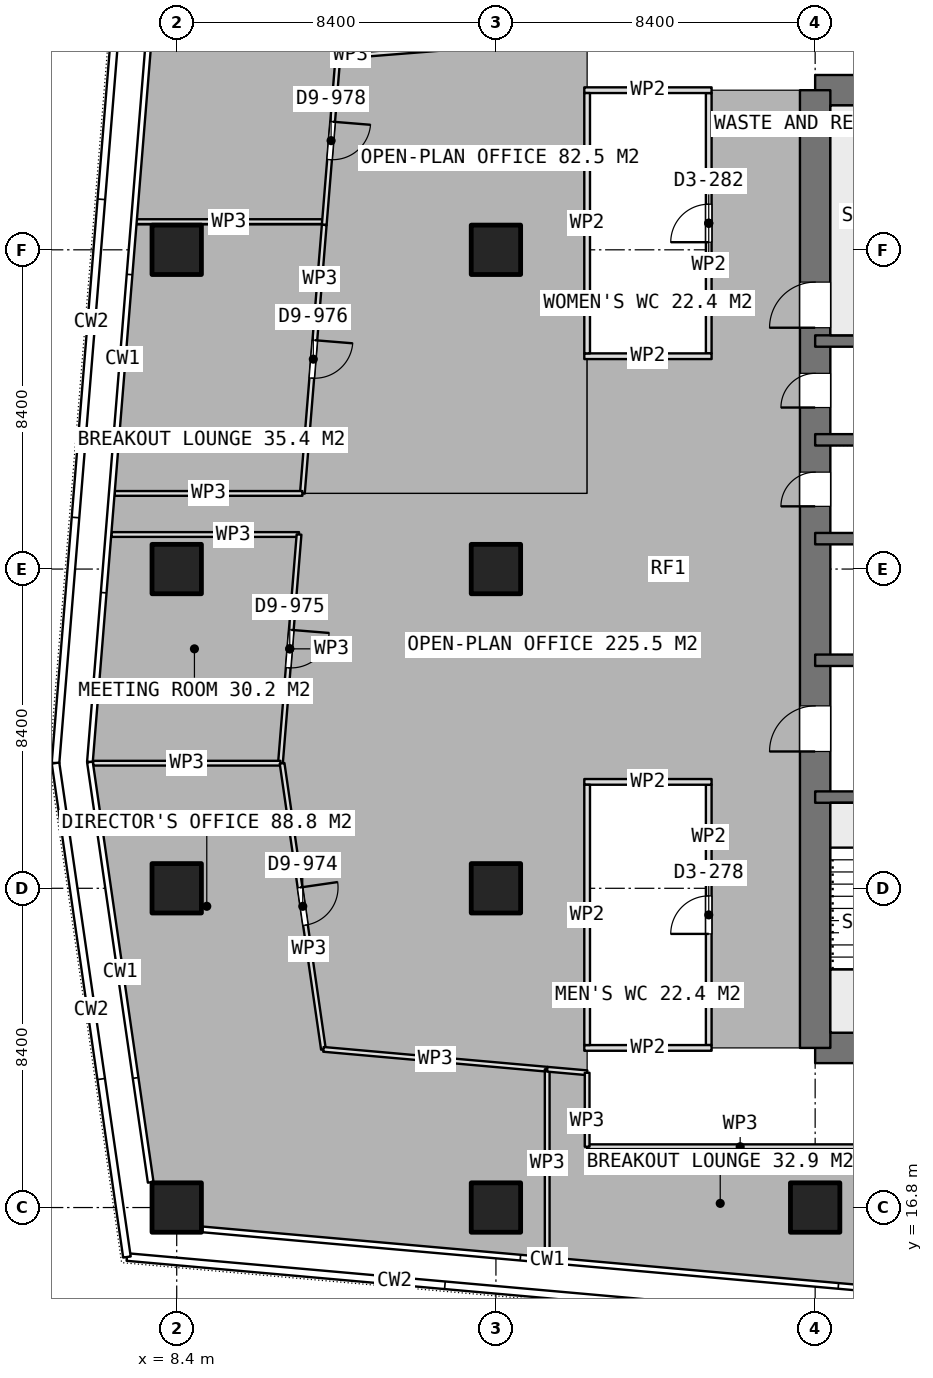
"""IFC4 building model, lengths in metres.
Left out: names, types, materials, properties, quantities, classifications, styles, units other than length and angle.
Written with IfcOpenShell. Run it as: python <this file> out.ifc"""

import sys

from ifc_helpers import new_model, si_unit, direction, frame, frame_2d, origin, origin_2d, place, context, subcontext, project, spatial, rectangle, extrude, element, fill, save


model = new_model("IFC4")
c1 = context("Model", 3, precision=1e-05, world=origin(), true_north=direction((0.0, 1.0)))
c2 = subcontext(c1, "Body", "Model", "MODEL_VIEW")
j1 = project(units=[si_unit("LENGTHUNIT", "METRE"), si_unit("PLANEANGLEUNIT", "RADIAN")], contexts=[c1])
p1 = place(None, origin())
s1 = spatial("IfcSite", under=j1, at=p1, CompositionType="ELEMENT")
p2 = place(p1, origin())
s2 = spatial("IfcBuilding", under=s1, at=p2, CompositionType="ELEMENT")
p3 = place(p2, frame((0.0, 0.0, 261.35)))
s3 = spatial("IfcBuildingStorey", under=s2, at=p3, CompositionType="ELEMENT", Elevation=261.35)
for number, where, z_axis, x_axis in (
    (1, (25.2, 21.0, 0.0), (0.0, 0.0, 1.0), (1.0, 0.0, 0.0)),
    (2, (25.2, 46.2, 0.0), (0.0, 0.0, 1.0), (1.0, 0.0, 0.0)),
):
    element("IfcWall", number, at=place(p3, frame(where, z_axis=z_axis, x_axis=x_axis)), inside=s3, PredefinedType="SHEAR", context=c2, shape_type="SweptSolid", body=[
        extrude(rectangle(XDim=10.4, YDim=0.8, at=frame_2d((5.2, 0.0))), origin(), (0.0, 0.0, 1.0), 3.75),
    ])
p4 = place(p3, frame((25.2, 21.0, 0.0), z_axis=(0.0, 0.0, 1.0), x_axis=(0.0, 1.0, 0.0)))
e3 = element("IfcWall", 3, at=p4, inside=s3, PredefinedType="SHEAR", context=c2, shape_type="SweptSolid", body=[
    extrude(rectangle(XDim=25.2, YDim=0.8, at=frame_2d((12.6, 0.0))), origin(), (0.0, 0.0, 1.0), 3.75),
])
p5 = place(p4, frame((7.8, 0.0, 0.0)))
e4 = element("IfcOpeningElement", 4, at=p5, cuts=e3, PredefinedType="OPENING", context=c2, shape_type="SweptSolid", body=[
    extrude(rectangle(XDim=1.2, YDim=2.1, at=frame_2d((0.6, 1.05))), frame((0.0, 0.41, 0.0), z_axis=(0.0, -1.0, 0.0), x_axis=(1.0, 0.0, 0.0)), (0.0, 0.0, 1.0), 0.82),
])
p6 = place(p4, frame((14.25, 0.0, 0.0)))
e5 = element("IfcOpeningElement", 5, at=p6, cuts=e3, PredefinedType="OPENING", context=c2, shape_type="SweptSolid", body=[
    extrude(rectangle(XDim=0.9, YDim=2.1, at=frame_2d((0.45, 1.05))), frame((0.0, 0.41, 0.0), z_axis=(0.0, -1.0, 0.0), x_axis=(1.0, 0.0, 0.0)), (0.0, 0.0, 1.0), 0.82),
])
p7 = place(p4, frame((16.85, 0.0, 0.0)))
e6 = element("IfcOpeningElement", 6, at=p7, cuts=e3, PredefinedType="OPENING", context=c2, shape_type="SweptSolid", body=[
    extrude(rectangle(XDim=0.9, YDim=2.1, at=frame_2d((0.45, 1.05))), frame((0.0, 0.41, 0.0), z_axis=(0.0, -1.0, 0.0), x_axis=(1.0, 0.0, 0.0)), (0.0, 0.0, 1.0), 0.82),
])
p8 = place(p4, frame((18.95, 0.0, 0.0)))
e7 = element("IfcOpeningElement", 7, at=p8, cuts=e3, PredefinedType="OPENING", context=c2, shape_type="SweptSolid", body=[
    extrude(rectangle(XDim=1.2, YDim=2.1, at=frame_2d((0.6, 1.05))), frame((0.0, 0.41, 0.0), z_axis=(0.0, -1.0, 0.0), x_axis=(1.0, 0.0, 0.0)), (0.0, 0.0, 1.0), 0.82),
])
p9 = place(p3, frame((25.2, 27.6, 0.0), z_axis=(0.0, 0.0, 1.0), x_axis=(1.0, 0.0, 0.0)))
e8 = element("IfcWall", 8, at=p9, inside=s3, PredefinedType="SHEAR", context=c2, shape_type="SweptSolid", body=[
    extrude(rectangle(XDim=6.6, YDim=0.3, at=frame_2d((3.3, 0.0))), origin(), (0.0, 0.0, 1.0), 3.75),
])
p10 = place(p9, frame((5.05, 0.0, 0.0)))
e9 = element("IfcOpeningElement", 9, at=p10, cuts=e8, PredefinedType="OPENING", context=c2, shape_type="SweptSolid", body=[
    extrude(rectangle(XDim=1.2, YDim=2.1, at=frame_2d((0.6, 1.05))), frame((0.0, 0.16, 0.0), z_axis=(0.0, -1.0, 0.0), x_axis=(1.0, 0.0, 0.0)), (0.0, 0.0, 1.0), 0.32),
])
p11 = place(p3, frame((25.2, 31.2, 0.0), z_axis=(0.0, 0.0, 1.0), x_axis=(1.0, 0.0, 0.0)))
e10 = element("IfcWall", 10, at=p11, inside=s3, PredefinedType="SHEAR", context=c2, shape_type="SweptSolid", body=[
    extrude(rectangle(XDim=6.6, YDim=0.3, at=frame_2d((3.3, 0.0))), origin(), (0.0, 0.0, 1.0), 3.75),
])
p12 = place(p11, frame((2.65, 0.0, 0.0)))
e11 = element("IfcOpeningElement", 11, at=p12, cuts=e10, PredefinedType="OPENING", context=c2, shape_type="SweptSolid", body=[
    extrude(rectangle(XDim=1.3, YDim=2.1, at=frame_2d((0.65, 1.05))), frame((0.0, 0.16, 0.0), z_axis=(0.0, -1.0, 0.0), x_axis=(1.0, 0.0, 0.0)), (0.0, 0.0, 1.0), 0.32),
])
for number, where, z_axis, x_axis in (
    (12, (25.2, 34.4, 0.0), (0.0, 0.0, 1.0), (1.0, 0.0, 0.0)),
    (13, (25.2, 37.0, 0.0), (0.0, 0.0, 1.0), (1.0, 0.0, 0.0)),
    (14, (25.2, 39.6, 0.0), (0.0, 0.0, 1.0), (1.0, 0.0, 0.0)),
):
    element("IfcWall", number, at=place(p3, frame(where, z_axis=z_axis, x_axis=x_axis)), inside=s3, PredefinedType="SHEAR", context=c2, shape_type="SweptSolid", body=[
        extrude(rectangle(XDim=6.6, YDim=0.3, at=frame_2d((3.3, 0.0))), origin(), (0.0, 0.0, 1.0), 3.75),
    ])
for number, where, z_axis, x_axis in (
    (15, (8.4, 16.8, 0.0), (0.0, 0.0, 1.0), (1.0, 0.0, 0.0)),
    (16, (8.4, 25.2, 0.0), (0.0, 0.0, 1.0), (1.0, 0.0, 0.0)),
    (17, (8.4, 33.6, 0.0), (0.0, 0.0, 1.0), (1.0, 0.0, 0.0)),
    (18, (8.4, 42.0, 0.0), (0.0, 0.0, 1.0), (1.0, 0.0, 0.0)),
    (19, (16.8, 16.8, 0.0), (0.0, 0.0, 1.0), (1.0, 0.0, 0.0)),
    (20, (16.8, 25.2, 0.0), (0.0, 0.0, 1.0), (1.0, 0.0, 0.0)),
    (21, (16.8, 33.6, 0.0), (0.0, 0.0, 1.0), (1.0, 0.0, 0.0)),
    (22, (16.8, 42.0, 0.0), (0.0, 0.0, 1.0), (1.0, 0.0, 0.0)),
    (23, (25.2, 16.8, 0.0), (0.0, 0.0, 1.0), (1.0, 0.0, 0.0)),
):
    element("IfcColumn", number, at=place(p3, frame(where, z_axis=z_axis, x_axis=x_axis)), inside=s3, PredefinedType="COLUMN", context=c2, shape_type="SweptSolid", body=[
        extrude(rectangle(XDim=1.3, YDim=1.3, at=origin_2d()), origin(), (0.0, 0.0, 1.0), 3.75),
    ])
for number, where, z_axis, x_axis in (
    (24, (19.125, 39.2, 0.0), (0.0, 0.0, 1.0), (1.0, 0.0, 0.0)),
    (25, (19.125, 46.2, 0.0), (0.0, 0.0, 1.0), (1.0, 0.0, 0.0)),
):
    element("IfcWall", number, at=place(p3, frame(where, z_axis=z_axis, x_axis=x_axis)), inside=s3, PredefinedType="PARTITIONING", context=c2, shape_type="SweptSolid", body=[
        extrude(rectangle(XDim=3.35, YDim=0.15, at=frame_2d((1.675, 0.0))), origin(), (0.0, 0.0, 1.0), 3.5),
    ])
p13 = place(p3, frame((19.2, 39.275, 0.0), z_axis=(0.0, 0.0, 1.0), x_axis=(0.0, 1.0, 0.0)))
e26 = element("IfcWall", 26, at=p13, inside=s3, PredefinedType="PARTITIONING", context=c2, shape_type="SweptSolid", body=[
    extrude(rectangle(XDim=6.85, YDim=0.15, at=frame_2d((3.425, 0.0))), origin(), (0.0, 0.0, 1.0), 3.5),
])
p14 = place(p3, frame((22.4, 39.275, 0.0), z_axis=(0.0, 0.0, 1.0), x_axis=(0.0, 1.0, 0.0)))
e27 = element("IfcWall", 27, at=p14, inside=s3, PredefinedType="PARTITIONING", context=c2, shape_type="SweptSolid", body=[
    extrude(rectangle(XDim=6.85, YDim=0.15, at=frame_2d((3.425, 0.0))), origin(), (0.0, 0.0, 1.0), 3.5),
])
p15 = place(p14, frame((2.925, 0.0, 0.0)))
e28 = element("IfcOpeningElement", 28, at=p15, cuts=e27, PredefinedType="OPENING", context=c2, shape_type="SweptSolid", body=[
    extrude(rectangle(XDim=1.0, YDim=2.1, at=frame_2d((0.5, 1.05))), frame((0.0, 0.085, 0.0), z_axis=(0.0, -1.0, 0.0), x_axis=(1.0, 0.0, 0.0)), (0.0, 0.0, 1.0), 0.17),
])
for number, where, z_axis, x_axis in (
    (29, (19.125, 21.0, 0.0), (0.0, 0.0, 1.0), (1.0, 0.0, 0.0)),
    (30, (19.125, 28.0, 0.0), (0.0, 0.0, 1.0), (1.0, 0.0, 0.0)),
):
    element("IfcWall", number, at=place(p3, frame(where, z_axis=z_axis, x_axis=x_axis)), inside=s3, PredefinedType="PARTITIONING", context=c2, shape_type="SweptSolid", body=[
        extrude(rectangle(XDim=3.35, YDim=0.15, at=frame_2d((1.675, 0.0))), origin(), (0.0, 0.0, 1.0), 3.5),
    ])
p16 = place(p3, frame((19.2, 21.075, 0.0), z_axis=(0.0, 0.0, 1.0), x_axis=(0.0, 1.0, 0.0)))
e31 = element("IfcWall", 31, at=p16, inside=s3, PredefinedType="PARTITIONING", context=c2, shape_type="SweptSolid", body=[
    extrude(rectangle(XDim=6.85, YDim=0.15, at=frame_2d((3.425, 0.0))), origin(), (0.0, 0.0, 1.0), 3.5),
])
p17 = place(p3, frame((22.4, 21.075, 0.0), z_axis=(0.0, 0.0, 1.0), x_axis=(0.0, 1.0, 0.0)))
e32 = element("IfcWall", 32, at=p17, inside=s3, PredefinedType="PARTITIONING", context=c2, shape_type="SweptSolid", body=[
    extrude(rectangle(XDim=6.85, YDim=0.15, at=frame_2d((3.425, 0.0))), origin(), (0.0, 0.0, 1.0), 3.5),
])
p18 = place(p17, frame((2.925, 0.0, 0.0)))
e33 = element("IfcOpeningElement", 33, at=p18, cuts=e32, PredefinedType="OPENING", context=c2, shape_type="SweptSolid", body=[
    extrude(rectangle(XDim=1.0, YDim=2.1, at=frame_2d((0.5, 1.05))), frame((0.0, 0.085, 0.0), z_axis=(0.0, -1.0, 0.0), x_axis=(1.0, 0.0, 0.0)), (0.0, 0.0, 1.0), 0.17),
])
p19 = place(p3, frame((12.226, 42.742, 0.0), z_axis=(0.0, 0.0, 1.0), x_axis=(-1.0, 0.0, 0.0)))
e34 = element("IfcWall", 34, at=p19, inside=s3, PredefinedType="PARTITIONING", context=c2, shape_type="SweptSolid", body=[
    extrude(rectangle(XDim=4.903, YDim=0.125, at=frame_2d((2.452, 0.0))), origin(), (0.0, 0.0, 1.0), 3.5),
])
p20 = place(p3, frame((15.95, 47.351, 0.0), z_axis=(0.0, 0.0, 1.0), x_axis=(-0.99682463174, -0.07962822086, 0.0)))
e35 = element("IfcWall", 35, at=p20, inside=s3, PredefinedType="PARTITIONING", context=c2, shape_type="SweptSolid", body=[
    extrude(rectangle(XDim=3.317, YDim=0.125, at=frame_2d((1.659, 0.0))), origin(), (0.0, 0.0, 1.0), 3.5),
])
p21 = place(p3, frame((12.643, 47.087, 0.0), z_axis=(0.0, 0.0, 1.0), x_axis=(-0.081240627764, -0.996694517092, 0.0)))
e36 = element("IfcWall", 36, at=p21, inside=s3, PredefinedType="PARTITIONING", context=c2, shape_type="SweptSolid", body=[
    extrude(rectangle(XDim=4.445, YDim=0.125, at=frame_2d((2.222, 0.0))), origin(), (0.0, 0.0, 1.0), 3.5),
])
p22 = place(p21, frame((1.722, 0.0, 0.0)))
e37 = element("IfcOpeningElement", 37, at=p22, cuts=e36, PredefinedType="OPENING", context=c2, shape_type="SweptSolid", body=[
    extrude(rectangle(XDim=1.0, YDim=2.1, at=frame_2d((0.5, 1.05))), frame((0.0, 0.073, 0.0), z_axis=(0.0, -1.0, 0.0), x_axis=(1.0, 0.0, 0.0)), (0.0, 0.0, 1.0), 0.145),
])
p23 = place(p3, frame((12.282, 42.656, 0.0), z_axis=(0.0, 0.0, 1.0), x_axis=(-0.08110159124, -0.996705840205, 0.0)))
e38 = element("IfcWall", 38, at=p23, inside=s3, PredefinedType="PARTITIONING", context=c2, shape_type="SweptSolid", body=[
    extrude(rectangle(XDim=7.089, YDim=0.125, at=frame_2d((3.545, 0.0))), origin(), (0.0, 0.0, 1.0), 3.5),
])
p24 = place(p23, frame((3.045, 0.0, 0.0)))
e39 = element("IfcOpeningElement", 39, at=p24, cuts=e38, PredefinedType="OPENING", context=c2, shape_type="SweptSolid", body=[
    extrude(rectangle(XDim=1.0, YDim=2.1, at=frame_2d((0.5, 1.05))), frame((0.0, 0.073, 0.0), z_axis=(0.0, -1.0, 0.0), x_axis=(1.0, 0.0, 0.0)), (0.0, 0.0, 1.0), 0.145),
])
p25 = place(p3, frame((11.707, 35.59, 0.0), z_axis=(0.0, 0.0, 1.0), x_axis=(-1.0, 0.0, 0.0)))
e40 = element("IfcWall", 40, at=p25, inside=s3, PredefinedType="PARTITIONING", context=c2, shape_type="SweptSolid", body=[
    extrude(rectangle(XDim=4.936, YDim=0.125, at=frame_2d((2.468, 0.0))), origin(), (0.0, 0.0, 1.0), 3.5),
])
p26 = place(p3, frame((6.683, 34.509, 0.0), z_axis=(0.0, 0.0, 1.0), x_axis=(1.0, 0.0, 0.0)))
e41 = element("IfcWall", 41, at=p26, inside=s3, PredefinedType="PARTITIONING", context=c2, shape_type="SweptSolid", body=[
    extrude(rectangle(XDim=4.936, YDim=0.125, at=frame_2d((2.468, 0.0))), origin(), (0.0, 0.0, 1.0), 3.5),
])
p27 = place(p3, frame((11.619, 34.509, 0.0), z_axis=(0.0, 0.0, 1.0), x_axis=(-0.081003722278, -0.99671379893, 0.0)))
e42 = element("IfcWall", 42, at=p27, inside=s3, PredefinedType="PARTITIONING", context=c2, shape_type="SweptSolid", body=[
    extrude(rectangle(XDim=6.037, YDim=0.125, at=frame_2d((3.019, 0.0))), origin(), (0.0, 0.0, 1.0), 3.5),
])
p28 = place(p27, frame((2.518, 0.0, 0.0)))
e43 = element("IfcOpeningElement", 43, at=p28, cuts=e42, PredefinedType="OPENING", context=c2, shape_type="SweptSolid", body=[
    extrude(rectangle(XDim=1.0, YDim=2.1, at=frame_2d((0.5, 1.05))), frame((0.0, 0.073, 0.0), z_axis=(0.0, -1.0, 0.0), x_axis=(1.0, 0.0, 0.0)), (0.0, 0.0, 1.0), 0.145),
])
p29 = place(p3, frame((11.13, 28.492, 0.0), z_axis=(0.0, 0.0, 1.0), x_axis=(-1.0, 0.0, 0.0)))
e44 = element("IfcWall", 44, at=p29, inside=s3, PredefinedType="PARTITIONING", context=c2, shape_type="SweptSolid", body=[
    extrude(rectangle(XDim=4.929, YDim=0.125, at=frame_2d((2.464, 0.0))), origin(), (0.0, 0.0, 1.0), 3.5),
])
p30 = place(p3, frame((11.173, 28.488, 0.0), z_axis=(0.0, 0.0, 1.0), x_axis=(0.143061748966, -0.989713764673, 0.0)))
e45 = element("IfcWall", 45, at=p30, inside=s3, PredefinedType="PARTITIONING", context=c2, shape_type="SweptSolid", body=[
    extrude(rectangle(XDim=7.604, YDim=0.125, at=frame_2d((3.802, 0.0))), origin(), (0.0, 0.0, 1.0), 3.5),
])
p31 = place(p30, frame((3.301, 0.0, 0.0)))
e46 = element("IfcOpeningElement", 46, at=p31, cuts=e45, PredefinedType="OPENING", context=c2, shape_type="SweptSolid", body=[
    extrude(rectangle(XDim=1.0, YDim=2.1, at=frame_2d((0.5, 1.05))), frame((0.0, 0.073, 0.0), z_axis=(0.0, -1.0, 0.0), x_axis=(1.0, 0.0, 0.0)), (0.0, 0.0, 1.0), 0.145),
])
p32 = place(p3, frame((12.261, 20.962, 0.0), z_axis=(0.0, 0.0, 1.0), x_axis=(0.996078951833, -0.08846876124, 0.0)))
e47 = element("IfcWall", 47, at=p32, inside=s3, PredefinedType="PARTITIONING", context=c2, shape_type="SweptSolid", body=[
    extrude(rectangle(XDim=5.911, YDim=0.125, at=frame_2d((2.956, 0.0))), origin(), (0.0, 0.0, 1.0), 3.5),
])
p33 = place(p3, frame((18.149, 20.439, 0.0), z_axis=(0.0, 0.0, 1.0), x_axis=(0.0, -1.0, 0.0)))
e48 = element("IfcWall", 48, at=p33, inside=s3, PredefinedType="PARTITIONING", context=c2, shape_type="SweptSolid", body=[
    extrude(rectangle(XDim=4.939, YDim=0.125, at=frame_2d((2.469, 0.0))), origin(), (0.0, 0.0, 1.0), 3.5),
])
p34 = place(p3, frame((19.2, 18.4, 0.0), z_axis=(0.0, 0.0, 1.0), x_axis=(1.0, 0.0, 0.0)))
e49 = element("IfcWall", 49, at=p34, inside=s3, PredefinedType="PARTITIONING", context=c2, shape_type="SweptSolid", body=[
    extrude(rectangle(XDim=8.054, YDim=0.125, at=frame_2d((4.027, 0.0))), origin(), (0.0, 0.0, 1.0), 3.5),
])
p35 = place(p3, frame((18.15, 20.439, 0.0), z_axis=(0.0, 0.0, 1.0), x_axis=(0.996099374617, -0.088238517026, 0.0)))
e50 = element("IfcWall", 50, at=p35, inside=s3, PredefinedType="PARTITIONING", context=c2, shape_type="SweptSolid", body=[
    extrude(rectangle(XDim=1.054, YDim=0.125, at=frame_2d((0.527, 0.0))), origin(), (0.0, 0.0, 1.0), 3.5),
])
p36 = place(p3, frame((19.2, 20.346, 0.0), z_axis=(0.0, 0.0, 1.0), x_axis=(0.0, -1.0, 0.0)))
e51 = element("IfcWall", 51, at=p36, inside=s3, PredefinedType="PARTITIONING", context=c2, shape_type="SweptSolid", body=[
    extrude(rectangle(XDim=1.946, YDim=0.125, at=frame_2d((0.973, 0.0))), origin(), (0.0, 0.0, 1.0), 3.5),
])
p37 = place(p5, origin())
e52 = element("IfcDoor", 52, at=p37, inside=s3, OperationType="SINGLE_SWING_LEFT", PredefinedType="DOOR", context=c2, shape_type="SweptSolid", body=[
    extrude(rectangle(XDim=1.2, YDim=2.1, at=frame_2d((0.6, 1.05))), frame((0.0, 0.025, 0.0), z_axis=(0.0, -1.0, 0.0), x_axis=(1.0, 0.0, 0.0)), (0.0, 0.0, 1.0), 0.05),
])
fill(e4, e52)
p38 = place(p6, origin())
e53 = element("IfcDoor", 53, at=p38, inside=s3, OperationType="SINGLE_SWING_LEFT", PredefinedType="DOOR", context=c2, shape_type="SweptSolid", body=[
    extrude(rectangle(XDim=0.9, YDim=2.1, at=frame_2d((0.45, 1.05))), frame((0.0, 0.025, 0.0), z_axis=(0.0, -1.0, 0.0), x_axis=(1.0, 0.0, 0.0)), (0.0, 0.0, 1.0), 0.05),
])
fill(e5, e53)
p39 = place(p7, origin())
e54 = element("IfcDoor", 54, at=p39, inside=s3, OperationType="SINGLE_SWING_LEFT", PredefinedType="DOOR", context=c2, shape_type="SweptSolid", body=[
    extrude(rectangle(XDim=0.9, YDim=2.1, at=frame_2d((0.45, 1.05))), frame((0.0, 0.025, 0.0), z_axis=(0.0, -1.0, 0.0), x_axis=(1.0, 0.0, 0.0)), (0.0, 0.0, 1.0), 0.05),
])
fill(e6, e54)
p40 = place(p15, origin())
e55 = element("IfcDoor", 55, at=p40, inside=s3, OperationType="SINGLE_SWING_LEFT", PredefinedType="DOOR", context=c2, shape_type="SweptSolid", body=[
    extrude(rectangle(XDim=1.0, YDim=2.1, at=frame_2d((0.5, 1.05))), frame((0.0, 0.025, 0.0), z_axis=(0.0, -1.0, 0.0), x_axis=(1.0, 0.0, 0.0)), (0.0, 0.0, 1.0), 0.05),
])
fill(e28, e55)
p41 = place(p18, origin())
e56 = element("IfcDoor", 56, at=p41, inside=s3, OperationType="SINGLE_SWING_LEFT", PredefinedType="DOOR", context=c2, shape_type="SweptSolid", body=[
    extrude(rectangle(XDim=1.0, YDim=2.1, at=frame_2d((0.5, 1.05))), frame((0.0, 0.025, 0.0), z_axis=(0.0, -1.0, 0.0), x_axis=(1.0, 0.0, 0.0)), (0.0, 0.0, 1.0), 0.05),
])
fill(e33, e56)
p42 = place(p22, origin())
e57 = element("IfcDoor", 57, at=p42, inside=s3, OperationType="SINGLE_SWING_LEFT", PredefinedType="DOOR", context=c2, shape_type="SweptSolid", body=[
    extrude(rectangle(XDim=1.0, YDim=2.1, at=frame_2d((0.5, 1.05))), frame((0.0, 0.025, 0.0), z_axis=(0.0, -1.0, 0.0), x_axis=(1.0, 0.0, 0.0)), (0.0, 0.0, 1.0), 0.05),
])
fill(e37, e57)
p43 = place(p24, origin())
e58 = element("IfcDoor", 58, at=p43, inside=s3, OperationType="SINGLE_SWING_LEFT", PredefinedType="DOOR", context=c2, shape_type="SweptSolid", body=[
    extrude(rectangle(XDim=1.0, YDim=2.1, at=frame_2d((0.5, 1.05))), frame((0.0, 0.025, 0.0), z_axis=(0.0, -1.0, 0.0), x_axis=(1.0, 0.0, 0.0)), (0.0, 0.0, 1.0), 0.05),
])
fill(e39, e58)
p44 = place(p28, origin())
e59 = element("IfcDoor", 59, at=p44, inside=s3, OperationType="SINGLE_SWING_LEFT", PredefinedType="DOOR", context=c2, shape_type="SweptSolid", body=[
    extrude(rectangle(XDim=1.0, YDim=2.1, at=frame_2d((0.5, 1.05))), frame((0.0, 0.025, 0.0), z_axis=(0.0, -1.0, 0.0), x_axis=(1.0, 0.0, 0.0)), (0.0, 0.0, 1.0), 0.05),
])
fill(e43, e59)
p45 = place(p31, origin())
e60 = element("IfcDoor", 60, at=p45, inside=s3, OperationType="SINGLE_SWING_LEFT", PredefinedType="DOOR", context=c2, shape_type="SweptSolid", body=[
    extrude(rectangle(XDim=1.0, YDim=2.1, at=frame_2d((0.5, 1.05))), frame((0.0, 0.025, 0.0), z_axis=(0.0, -1.0, 0.0), x_axis=(1.0, 0.0, 0.0)), (0.0, 0.0, 1.0), 0.05),
])
fill(e46, e60)
p46 = place(p8, origin())
e61 = element("IfcDoor", 61, at=p46, inside=s3, OperationType="SINGLE_SWING_RIGHT", PredefinedType="DOOR", context=c2, shape_type="SweptSolid", body=[
    extrude(rectangle(XDim=1.2, YDim=2.1, at=frame_2d((0.6, 1.05))), frame((0.0, 0.025, 0.0), z_axis=(0.0, -1.0, 0.0), x_axis=(1.0, 0.0, 0.0)), (0.0, 0.0, 1.0), 0.05),
])
fill(e7, e61)
save(model, sys.argv[1])
